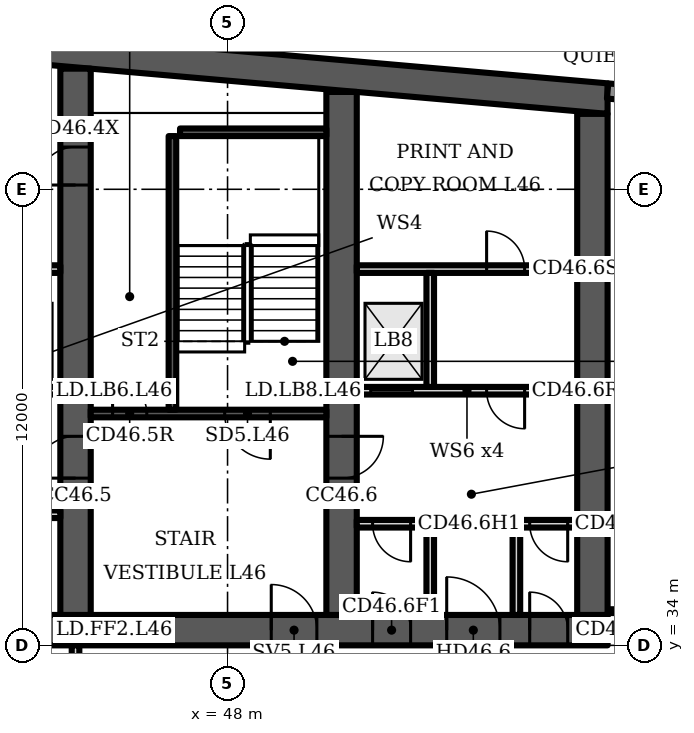
"""IFC4 building model, lengths in metres.
Left out: names, types, materials, properties, quantities, classifications, styles, units other than length and angle.
Written with IfcOpenShell. Run it as: python <this file> out.ifc"""

import sys

from ifc_helpers import new_model, si_unit, direction, frame, frame_2d, origin, place, context, subcontext, project, spatial, polyline, rectangle, outline, extrude, element, fill, save


model = new_model("IFC4")
c1 = context("Model", 3, precision=1e-05, world=origin(), true_north=direction((0.0, 1.0)))
c2 = subcontext(c1, "Body", "Model", "MODEL_VIEW")
j1 = project(units=[si_unit("LENGTHUNIT", "METRE"), si_unit("PLANEANGLEUNIT", "RADIAN")], contexts=[c1])
p1 = place(None, origin())
s1 = spatial("IfcSite", under=j1, at=p1, CompositionType="ELEMENT")
p2 = place(p1, origin())
s2 = spatial("IfcBuilding", under=s1, at=p2, CompositionType="ELEMENT")
p3 = place(p2, frame((0.0, 0.0, 187.9)))
s3 = spatial("IfcBuildingStorey", under=s2, at=p3, CompositionType="ELEMENT", Elevation=187.9)
p4 = place(p3, origin())
e1 = element("IfcWall", 1, at=p4, inside=s3, PredefinedType="SHEAR", context=c2, shape_type="SweptSolid", body=[
    extrude(outline(polyline([(16.0, 47.984), (37.0, 49.822), (58.0, 47.984), (58.0, 48.787), (37.0, 50.625), (16.0, 48.787), (16.0, 47.984)])), origin(), (0.0, 0.0, 1.0), 3.6),
])
p5 = place(p3, frame((16.0, 34.4, 0.0), z_axis=(0.0, 0.0, 1.0), x_axis=(1.0, 0.0, 0.0)))
e2 = element("IfcWall", 2, at=p5, inside=s3, PredefinedType="SHEAR", context=c2, shape_type="SweptSolid", body=[
    extrude(rectangle(XDim=42.0, YDim=0.8, at=frame_2d((21.0, 0.0))), origin(), (0.0, 0.0, 1.0), 3.6),
])
p6 = place(p5, frame((3.2, 0.0, 0.0)))
e3 = element("IfcOpeningElement", 3, at=p6, cuts=e2, PredefinedType="OPENING", context=c2, shape_type="SweptSolid", body=[
    extrude(rectangle(XDim=1.0, YDim=2.1, at=frame_2d((0.5, 1.05))), frame((0.0, 0.41, 0.0), z_axis=(0.0, -1.0, 0.0), x_axis=(1.0, 0.0, 0.0)), (0.0, 0.0, 1.0), 0.82),
])
p7 = place(p5, frame((7.65, 0.0, 0.0)))
e4 = element("IfcOpeningElement", 4, at=p7, cuts=e2, PredefinedType="OPENING", context=c2, shape_type="SweptSolid", body=[
    extrude(rectangle(XDim=1.2, YDim=2.1, at=frame_2d((0.6, 1.05))), frame((0.0, 0.41, 0.0), z_axis=(0.0, -1.0, 0.0), x_axis=(1.0, 0.0, 0.0)), (0.0, 0.0, 1.0), 0.82),
])
p8 = place(p5, frame((14.767, 0.0, 0.0)))
e5 = element("IfcOpeningElement", 5, at=p8, cuts=e2, PredefinedType="OPENING", context=c2, shape_type="SweptSolid", body=[
    extrude(rectangle(XDim=1.1, YDim=2.1, at=frame_2d((0.55, 1.05))), frame((0.0, 0.41, 0.0), z_axis=(0.0, -1.0, 0.0), x_axis=(1.0, 0.0, 0.0)), (0.0, 0.0, 1.0), 0.82),
])
p9 = place(p5, frame((19.133, 0.0, 0.0)))
e6 = element("IfcOpeningElement", 6, at=p9, cuts=e2, PredefinedType="OPENING", context=c2, shape_type="SweptSolid", body=[
    extrude(rectangle(XDim=1.1, YDim=2.1, at=frame_2d((0.55, 1.05))), frame((0.0, 0.41, 0.0), z_axis=(0.0, -1.0, 0.0), x_axis=(1.0, 0.0, 0.0)), (0.0, 0.0, 1.0), 0.82),
])
p10 = place(p5, frame((16.8, 0.0, 0.0)))
e7 = element("IfcOpeningElement", 7, at=p10, cuts=e2, PredefinedType="OPENING", context=c2, shape_type="SweptSolid", body=[
    extrude(rectangle(XDim=1.4, YDim=2.1, at=frame_2d((0.7, 1.05))), frame((0.0, 0.41, 0.0), z_axis=(0.0, -1.0, 0.0), x_axis=(1.0, 0.0, 0.0)), (0.0, 0.0, 1.0), 0.82),
])
p11 = place(p5, frame((21.767, 0.0, 0.0)))
e8 = element("IfcOpeningElement", 8, at=p11, cuts=e2, PredefinedType="OPENING", context=c2, shape_type="SweptSolid", body=[
    extrude(rectangle(XDim=1.1, YDim=2.1, at=frame_2d((0.55, 1.05))), frame((0.0, 0.41, 0.0), z_axis=(0.0, -1.0, 0.0), x_axis=(1.0, 0.0, 0.0)), (0.0, 0.0, 1.0), 0.82),
])
p12 = place(p5, frame((23.95, 0.0, 0.0)))
e9 = element("IfcOpeningElement", 9, at=p12, cuts=e2, PredefinedType="OPENING", context=c2, shape_type="SweptSolid", body=[
    extrude(rectangle(XDim=1.1, YDim=2.1, at=frame_2d((0.55, 1.05))), frame((0.0, 0.41, 0.0), z_axis=(0.0, -1.0, 0.0), x_axis=(1.0, 0.0, 0.0)), (0.0, 0.0, 1.0), 0.82),
])
p13 = place(p5, frame((26.133, 0.0, 0.0)))
e10 = element("IfcOpeningElement", 10, at=p13, cuts=e2, PredefinedType="OPENING", context=c2, shape_type="SweptSolid", body=[
    extrude(rectangle(XDim=1.1, YDim=2.1, at=frame_2d((0.55, 1.05))), frame((0.0, 0.41, 0.0), z_axis=(0.0, -1.0, 0.0), x_axis=(1.0, 0.0, 0.0)), (0.0, 0.0, 1.0), 0.82),
])
p14 = place(p5, frame((33.15, 0.0, 0.0)))
e11 = element("IfcOpeningElement", 11, at=p14, cuts=e2, PredefinedType="OPENING", context=c2, shape_type="SweptSolid", body=[
    extrude(rectangle(XDim=1.2, YDim=2.1, at=frame_2d((0.6, 1.05))), frame((0.0, 0.41, 0.0), z_axis=(0.0, -1.0, 0.0), x_axis=(1.0, 0.0, 0.0)), (0.0, 0.0, 1.0), 0.82),
])
p15 = place(p5, frame((35.817, 0.0, 0.0)))
e12 = element("IfcOpeningElement", 12, at=p15, cuts=e2, PredefinedType="OPENING", context=c2, shape_type="SweptSolid", body=[
    extrude(rectangle(XDim=1.0, YDim=2.1, at=frame_2d((0.5, 1.05))), frame((0.0, 0.41, 0.0), z_axis=(0.0, -1.0, 0.0), x_axis=(1.0, 0.0, 0.0)), (0.0, 0.0, 1.0), 0.82),
])
p16 = place(p5, frame((39.95, 0.0, 0.0)))
e13 = element("IfcOpeningElement", 13, at=p16, cuts=e2, PredefinedType="OPENING", context=c2, shape_type="SweptSolid", body=[
    extrude(rectangle(XDim=1.0, YDim=2.1, at=frame_2d((0.5, 1.05))), frame((0.0, 0.41, 0.0), z_axis=(0.0, -1.0, 0.0), x_axis=(1.0, 0.0, 0.0)), (0.0, 0.0, 1.0), 0.82),
])
p17 = place(p5, frame((37.767, 0.0, 0.0)))
e14 = element("IfcOpeningElement", 14, at=p17, cuts=e2, PredefinedType="OPENING", context=c2, shape_type="SweptSolid", body=[
    extrude(rectangle(XDim=1.4, YDim=2.1, at=frame_2d((0.7, 1.05))), frame((0.0, 0.41, 0.0), z_axis=(0.0, -1.0, 0.0), x_axis=(1.0, 0.0, 0.0)), (0.0, 0.0, 1.0), 0.82),
])
p18 = place(p3, frame((44.0, 34.8, 0.0), z_axis=(0.0, 0.0, 1.0), x_axis=(0.0, 1.0, 0.0)))
e15 = element("IfcWall", 15, at=p18, inside=s3, PredefinedType="SHEAR", context=c2, shape_type="SweptSolid", body=[
    extrude(rectangle(XDim=14.374, YDim=0.8, at=frame_2d((7.187, 0.0))), origin(), (0.0, 0.0, 1.0), 3.6),
])
p19 = place(p18, frame((11.312, 0.0, 0.0)))
e16 = element("IfcOpeningElement", 16, at=p19, cuts=e15, PredefinedType="OPENING", context=c2, shape_type="SweptSolid", body=[
    extrude(rectangle(XDim=1.0, YDim=2.1, at=frame_2d((0.5, 1.05))), frame((0.0, 0.41, 0.0), z_axis=(0.0, -1.0, 0.0), x_axis=(1.0, 0.0, 0.0)), (0.0, 0.0, 1.0), 0.82),
])
p20 = place(p18, frame((3.6, 0.0, 0.0)))
e17 = element("IfcOpeningElement", 17, at=p20, cuts=e15, PredefinedType="OPENING", context=c2, shape_type="SweptSolid", body=[
    extrude(rectangle(XDim=1.1, YDim=2.1, at=frame_2d((0.55, 1.05))), frame((0.0, 0.41, 0.0), z_axis=(0.0, -1.0, 0.0), x_axis=(1.0, 0.0, 0.0)), (0.0, 0.0, 1.0), 0.82),
])
p21 = place(p3, frame((51.0, 34.8, 0.0), z_axis=(0.0, 0.0, 1.0), x_axis=(0.0, 1.0, 0.0)))
e18 = element("IfcWall", 18, at=p21, inside=s3, PredefinedType="SHEAR", context=c2, shape_type="SweptSolid", body=[
    extrude(rectangle(XDim=13.762, YDim=0.8, at=frame_2d((6.881, 0.0))), origin(), (0.0, 0.0, 1.0), 3.6),
])
p22 = place(p21, frame((3.6, 0.0, 0.0)))
e19 = element("IfcOpeningElement", 19, at=p22, cuts=e18, PredefinedType="OPENING", context=c2, shape_type="SweptSolid", body=[
    extrude(rectangle(XDim=1.1, YDim=2.1, at=frame_2d((0.55, 1.05))), frame((0.0, 0.41, 0.0), z_axis=(0.0, -1.0, 0.0), x_axis=(1.0, 0.0, 0.0)), (0.0, 0.0, 1.0), 0.82),
])
p23 = place(p3, frame((57.6, 34.8, 0.0), z_axis=(0.0, 0.0, 1.0), x_axis=(0.0, 1.0, 0.0)))
e20 = element("IfcWall", 20, at=p23, inside=s3, PredefinedType="SHEAR", context=c2, shape_type="SweptSolid", body=[
    extrude(rectangle(XDim=13.184, YDim=0.8, at=frame_2d((6.592, 0.0))), origin(), (0.0, 0.0, 1.0), 3.6),
])
p24 = place(p3, frame((60.983, 48.326, 0.0), z_axis=(0.0, 0.0, 1.0), x_axis=(-0.996194, 0.087168, 0.0)))
e21 = element("IfcWall", 21, at=p24, inside=s3, PredefinedType="SOLIDWALL", context=c2, shape_type="SweptSolid", body=[
    extrude(rectangle(XDim=2.994, YDim=0.4, at=frame_2d((1.497, 0.0))), origin(), (0.0, 0.0, 1.0), 3.2),
])
p25 = place(p3, frame((37.4, 40.7, 0.0), z_axis=(0.0, 0.0, 1.0), x_axis=(1.0, 0.0, 0.0)))
e22 = element("IfcWall", 22, at=p25, inside=s3, PredefinedType="PARTITIONING", context=c2, shape_type="SweptSolid", body=[
    extrude(rectangle(XDim=6.2, YDim=0.2, at=frame_2d((3.1, 0.0))), origin(), (0.0, 0.0, 1.0), 3.2),
])
p26 = place(p25, frame((0.367, 0.0, 0.0)))
e23 = element("IfcOpeningElement", 23, at=p26, cuts=e22, PredefinedType="OPENING", context=c2, shape_type="SweptSolid", body=[
    extrude(rectangle(XDim=1.1, YDim=2.1, at=frame_2d((0.55, 1.05))), frame((0.0, 0.11, 0.0), z_axis=(0.0, -1.0, 0.0), x_axis=(1.0, 0.0, 0.0)), (0.0, 0.0, 1.0), 0.22),
])
p27 = place(p25, frame((2.55, 0.0, 0.0)))
e24 = element("IfcOpeningElement", 24, at=p27, cuts=e22, PredefinedType="OPENING", context=c2, shape_type="SweptSolid", body=[
    extrude(rectangle(XDim=1.1, YDim=2.1, at=frame_2d((0.55, 1.05))), frame((0.0, 0.11, 0.0), z_axis=(0.0, -1.0, 0.0), x_axis=(1.0, 0.0, 0.0)), (0.0, 0.0, 1.0), 0.22),
])
p28 = place(p25, frame((4.733, 0.0, 0.0)))
e25 = element("IfcOpeningElement", 25, at=p28, cuts=e22, PredefinedType="OPENING", context=c2, shape_type="SweptSolid", body=[
    extrude(rectangle(XDim=1.1, YDim=2.1, at=frame_2d((0.55, 1.05))), frame((0.0, 0.11, 0.0), z_axis=(0.0, -1.0, 0.0), x_axis=(1.0, 0.0, 0.0)), (0.0, 0.0, 1.0), 0.22),
])
p29 = place(p3, origin())
e26 = element("IfcWall", 26, at=p29, inside=s3, PredefinedType="PARTITIONING", context=c2, shape_type="SweptSolid", body=[
    extrude(outline(polyline([(41.567, 37.1), (39.433, 37.1), (39.433, 34.8), (39.233, 34.8), (39.233, 37.65), (37.4, 37.65), (37.4, 37.85), (39.233, 37.85), (39.433, 37.85), (39.433, 37.3), (41.567, 37.3), (41.567, 37.55), (41.767, 37.55), (43.6, 37.55), (43.6, 37.35), (41.767, 37.35), (41.767, 34.8), (41.567, 34.8), (41.567, 37.1)])), origin(), (0.0, 0.0, 1.0), 3.2),
])
p30 = place(p3, origin())
e27 = element("IfcWall", 27, at=p30, inside=s3, PredefinedType="PARTITIONING", context=c2, shape_type="SweptSolid", body=[
    extrude(outline(polyline([(39.433, 40.8), (39.233, 40.8), (39.233, 43.8), (37.4, 43.8), (37.4, 44.0), (43.6, 44.0), (43.6, 43.8), (41.767, 43.8), (41.767, 40.8), (41.567, 40.8), (41.567, 43.8), (39.433, 43.8), (39.433, 40.8)])), origin(), (0.0, 0.0, 1.0), 3.2),
])
p31 = place(p3, frame((44.4, 40.1, 0.0), z_axis=(0.0, 0.0, 1.0), x_axis=(1.0, 0.0, 0.0)))
e28 = element("IfcWall", 28, at=p31, inside=s3, PredefinedType="SHEAR", context=c2, shape_type="SweptSolid", body=[
    extrude(rectangle(XDim=6.2, YDim=0.2, at=frame_2d((3.1, 0.0))), origin(), (0.0, 0.0, 1.0), 3.2),
])
p32 = place(p31, frame((3.525, 0.0, 0.0)))
e29 = element("IfcOpeningElement", 29, at=p32, cuts=e28, PredefinedType="OPENING", context=c2, shape_type="SweptSolid", body=[
    extrude(rectangle(XDim=1.2, YDim=2.1, at=frame_2d((0.6, 1.05))), frame((0.0, 0.11, 0.0), z_axis=(0.0, -1.0, 0.0), x_axis=(1.0, 0.0, 0.0)), (0.0, 0.0, 1.0), 0.22),
])
p33 = place(p31, frame((0.575, 0.0, 0.0)))
e30 = element("IfcOpeningElement", 30, at=p33, cuts=e28, PredefinedType="OPENING", context=c2, shape_type="SweptSolid", body=[
    extrude(rectangle(XDim=0.9, YDim=2.1, at=frame_2d((0.45, 1.05))), frame((0.0, 0.11, 0.0), z_axis=(0.0, -1.0, 0.0), x_axis=(1.0, 0.0, 0.0)), (0.0, 0.0, 1.0), 0.22),
])
p34 = place(p3, frame((46.55, 40.2, 0.0), z_axis=(0.0, 0.0, 1.0), x_axis=(0.0, 1.0, 0.0)))
e31 = element("IfcWall", 31, at=p34, inside=s3, PredefinedType="SHEAR", context=c2, shape_type="SweptSolid", body=[
    extrude(rectangle(XDim=7.2, YDim=0.2, at=frame_2d((3.6, 0.0))), origin(), (0.0, 0.0, 1.0), 3.2),
])
p35 = place(p3, frame((46.75, 47.5, 0.0), z_axis=(0.0, 0.0, 1.0), x_axis=(1.0, 0.0, 0.0)))
e32 = element("IfcWall", 32, at=p35, inside=s3, PredefinedType="SHEAR", context=c2, shape_type="SweptSolid", body=[
    extrude(rectangle(XDim=3.85, YDim=0.2, at=frame_2d((1.925, 0.0))), origin(), (0.0, 0.0, 1.0), 3.2),
])
p36 = place(p3, frame((51.4, 37.2, 0.0), z_axis=(0.0, 0.0, 1.0), x_axis=(1.0, 0.0, 0.0)))
e33 = element("IfcWall", 33, at=p36, inside=s3, PredefinedType="PARTITIONING", context=c2, shape_type="SweptSolid", body=[
    extrude(rectangle(XDim=1.833, YDim=0.2, at=frame_2d((0.917, 0.0))), origin(), (0.0, 0.0, 1.0), 3.2),
])
p37 = place(p36, frame((0.417, 0.0, 0.0)))
e34 = element("IfcOpeningElement", 34, at=p37, cuts=e33, PredefinedType="OPENING", context=c2, shape_type="SweptSolid", body=[
    extrude(rectangle(XDim=1.0, YDim=2.1, at=frame_2d((0.5, 1.05))), frame((0.0, 0.11, 0.0), z_axis=(0.0, -1.0, 0.0), x_axis=(1.0, 0.0, 0.0)), (0.0, 0.0, 1.0), 0.22),
])
p38 = place(p3, frame((55.7, 37.2, 0.0), z_axis=(0.0, 0.0, 1.0), x_axis=(1.0, 0.0, 0.0)))
e35 = element("IfcWall", 35, at=p38, inside=s3, PredefinedType="PARTITIONING", context=c2, shape_type="SweptSolid", body=[
    extrude(rectangle(XDim=1.5, YDim=0.2, at=frame_2d((0.75, 0.0))), origin(), (0.0, 0.0, 1.0), 3.2),
])
p39 = place(p38, frame((0.25, 0.0, 0.0)))
e36 = element("IfcOpeningElement", 36, at=p39, cuts=e35, PredefinedType="OPENING", context=c2, shape_type="SweptSolid", body=[
    extrude(rectangle(XDim=1.0, YDim=2.1, at=frame_2d((0.5, 1.05))), frame((0.0, 0.11, 0.0), z_axis=(0.0, -1.0, 0.0), x_axis=(1.0, 0.0, 0.0)), (0.0, 0.0, 1.0), 0.22),
])
p40 = place(p3, frame((51.4, 40.7, 0.0), z_axis=(0.0, 0.0, 1.0), x_axis=(1.0, 0.0, 0.0)))
e37 = element("IfcWall", 37, at=p40, inside=s3, PredefinedType="PARTITIONING", context=c2, shape_type="SweptSolid", body=[
    extrude(rectangle(XDim=5.8, YDim=0.2, at=frame_2d((2.9, 0.0))), origin(), (0.0, 0.0, 1.0), 3.2),
])
p41 = place(p40, frame((0.367, 0.0, 0.0)))
e38 = element("IfcOpeningElement", 38, at=p41, cuts=e37, PredefinedType="OPENING", context=c2, shape_type="SweptSolid", body=[
    extrude(rectangle(XDim=1.1, YDim=2.1, at=frame_2d((0.55, 1.05))), frame((0.0, 0.11, 0.0), z_axis=(0.0, -1.0, 0.0), x_axis=(1.0, 0.0, 0.0)), (0.0, 0.0, 1.0), 0.22),
])
p42 = place(p40, frame((3.417, 0.0, 0.0)))
e39 = element("IfcOpeningElement", 39, at=p42, cuts=e37, PredefinedType="OPENING", context=c2, shape_type="SweptSolid", body=[
    extrude(rectangle(XDim=1.0, YDim=2.1, at=frame_2d((0.5, 1.05))), frame((0.0, 0.11, 0.0), z_axis=(0.0, -1.0, 0.0), x_axis=(1.0, 0.0, 0.0)), (0.0, 0.0, 1.0), 0.22),
])
p43 = place(p3, frame((51.4, 43.9, 0.0), z_axis=(0.0, 0.0, 1.0), x_axis=(1.0, 0.0, 0.0)))
e40 = element("IfcWall", 40, at=p43, inside=s3, PredefinedType="PARTITIONING", context=c2, shape_type="SweptSolid", body=[
    extrude(rectangle(XDim=5.8, YDim=0.2, at=frame_2d((2.9, 0.0))), origin(), (0.0, 0.0, 1.0), 3.2),
])
p44 = place(p43, frame((3.417, 0.0, 0.0)))
e41 = element("IfcOpeningElement", 41, at=p44, cuts=e40, PredefinedType="OPENING", context=c2, shape_type="SweptSolid", body=[
    extrude(rectangle(XDim=1.0, YDim=2.1, at=frame_2d((0.5, 1.05))), frame((0.0, 0.11, 0.0), z_axis=(0.0, -1.0, 0.0), x_axis=(1.0, 0.0, 0.0)), (0.0, 0.0, 1.0), 0.22),
])
p45 = place(p3, origin())
e42 = element("IfcWall", 42, at=p45, inside=s3, PredefinedType="PARTITIONING", context=c2, shape_type="SweptSolid", body=[
    extrude(outline(polyline([(53.233, 34.8), (53.233, 37.3), (53.433, 37.3), (53.433, 34.8), (53.233, 34.8)])), origin(), (0.0, 0.0, 1.0), 3.2),
])
p46 = place(p3, origin())
e43 = element("IfcWall", 43, at=p46, inside=s3, PredefinedType="PARTITIONING", context=c2, shape_type="SweptSolid", body=[
    extrude(outline(polyline([(55.5, 34.8), (55.5, 37.3), (55.7, 37.3), (55.7, 34.8), (55.5, 34.8)])), origin(), (0.0, 0.0, 1.0), 3.2),
])
p47 = place(p3, origin())
e44 = element("IfcWall", 44, at=p47, inside=s3, PredefinedType="PARTITIONING", context=c2, shape_type="SweptSolid", body=[
    extrude(outline(polyline([(53.433, 40.8), (53.433, 43.8), (53.233, 43.8), (53.233, 40.8), (53.433, 40.8)])), origin(), (0.0, 0.0, 1.0), 3.2),
])
p48 = place(p3, frame((44.0, 30.5, 0.0), z_axis=(0.0, 0.0, 1.0), x_axis=(0.0, 1.0, 0.0)))
e45 = element("IfcWall", 45, at=p48, inside=s3, PredefinedType="PARTITIONING", context=c2, shape_type="SweptSolid", body=[
    extrude(rectangle(XDim=3.5, YDim=0.2, at=frame_2d((1.75, 0.0))), origin(), (0.0, 0.0, 1.0), 3.2),
])
p49 = place(p48, frame((1.2, 0.0, 0.0)))
e46 = element("IfcOpeningElement", 46, at=p49, cuts=e45, PredefinedType="OPENING", context=c2, shape_type="SweptSolid", body=[
    extrude(rectangle(XDim=1.1, YDim=2.1, at=frame_2d((0.55, 1.05))), frame((0.0, 0.11, 0.0), z_axis=(0.0, -1.0, 0.0), x_axis=(1.0, 0.0, 0.0)), (0.0, 0.0, 1.0), 0.22),
])
p50 = place(p3, frame((58.02, 34.9, 0.0), z_axis=(0.0, 0.0, 1.0), x_axis=(1.0, 0.0, 0.0)))
e47 = element("IfcWall", 47, at=p50, inside=s3, PredefinedType="PARTITIONING", context=c2, shape_type="SweptSolid", body=[
    extrude(rectangle(XDim=1.48, YDim=0.1, at=frame_2d((0.74, 0.0))), origin(), (0.0, 0.0, 1.0), 3.2),
])
p51 = place(p19, origin())
e48 = element("IfcDoor", 48, at=p51, inside=s3, OperationType="SINGLE_SWING_LEFT", PredefinedType="DOOR", context=c2, shape_type="SweptSolid", body=[
    extrude(rectangle(XDim=1.0, YDim=2.1, at=frame_2d((0.5, 1.05))), frame((0.0, 0.4, 0.0), z_axis=(0.0, -1.0, 0.0), x_axis=(1.0, 0.0, 0.0)), (0.0, 0.0, 1.0), 0.8),
])
fill(e16, e48)
p52 = place(p32, origin())
e49 = element("IfcDoor", 49, at=p52, inside=s3, OperationType="SINGLE_SWING_RIGHT", PredefinedType="DOOR", context=c2, shape_type="SweptSolid", body=[
    extrude(rectangle(XDim=1.2, YDim=2.1, at=frame_2d((0.6, 1.05))), frame((0.0, 0.025, 0.0), z_axis=(0.0, -1.0, 0.0), x_axis=(1.0, 0.0, 0.0)), (0.0, 0.0, 1.0), 0.05),
])
fill(e29, e49)
p53 = place(p33, origin())
e50 = element("IfcDoor", 50, at=p53, inside=s3, OperationType="SINGLE_SWING_LEFT", PredefinedType="DOOR", context=c2, shape_type="SweptSolid", body=[
    extrude(rectangle(XDim=0.9, YDim=2.1, at=frame_2d((0.45, 1.05))), frame((0.0, 0.025, 0.0), z_axis=(0.0, -1.0, 0.0), x_axis=(1.0, 0.0, 0.0)), (0.0, 0.0, 1.0), 0.05),
])
fill(e30, e50)
p54 = place(p14, origin())
e51 = element("IfcDoor", 51, at=p54, inside=s3, OperationType="SINGLE_SWING_LEFT", PredefinedType="DOOR", context=c2, shape_type="SweptSolid", body=[
    extrude(rectangle(XDim=1.2, YDim=2.1, at=frame_2d((0.6, 1.05))), frame((0.0, 0.025, 0.0), z_axis=(0.0, -1.0, 0.0), x_axis=(1.0, 0.0, 0.0)), (0.0, 0.0, 1.0), 0.05),
])
fill(e11, e51)
p55 = place(p15, origin())
e52 = element("IfcDoor", 52, at=p55, inside=s3, OperationType="SINGLE_SWING_LEFT", PredefinedType="DOOR", context=c2, shape_type="SweptSolid", body=[
    extrude(rectangle(XDim=1.0, YDim=2.1, at=frame_2d((0.5, 1.05))), frame((0.0, 0.4, 0.0), z_axis=(0.0, -1.0, 0.0), x_axis=(1.0, 0.0, 0.0)), (0.0, 0.0, 1.0), 0.8),
])
fill(e12, e52)
p56 = place(p37, origin())
e53 = element("IfcDoor", 53, at=p56, inside=s3, OperationType="SINGLE_SWING_RIGHT", PredefinedType="DOOR", context=c2, shape_type="SweptSolid", body=[
    extrude(rectangle(XDim=1.0, YDim=2.1, at=frame_2d((0.5, 1.05))), frame((0.0, 0.025, 0.0), z_axis=(0.0, -1.0, 0.0), x_axis=(1.0, 0.0, 0.0)), (0.0, 0.0, 1.0), 0.05),
])
fill(e34, e53)
p57 = place(p16, origin())
e54 = element("IfcDoor", 54, at=p57, inside=s3, OperationType="SINGLE_SWING_LEFT", PredefinedType="DOOR", context=c2, shape_type="SweptSolid", body=[
    extrude(rectangle(XDim=1.0, YDim=2.1, at=frame_2d((0.5, 1.05))), frame((0.0, 0.4, 0.0), z_axis=(0.0, -1.0, 0.0), x_axis=(1.0, 0.0, 0.0)), (0.0, 0.0, 1.0), 0.8),
])
fill(e13, e54)
p58 = place(p39, origin())
e55 = element("IfcDoor", 55, at=p58, inside=s3, OperationType="SINGLE_SWING_RIGHT", PredefinedType="DOOR", context=c2, shape_type="SweptSolid", body=[
    extrude(rectangle(XDim=1.0, YDim=2.1, at=frame_2d((0.5, 1.05))), frame((0.0, 0.025, 0.0), z_axis=(0.0, -1.0, 0.0), x_axis=(1.0, 0.0, 0.0)), (0.0, 0.0, 1.0), 0.05),
])
fill(e36, e55)
p59 = place(p17, origin())
e56 = element("IfcDoor", 56, at=p59, inside=s3, OperationType="DOUBLE_DOOR_SINGLE_SWING", PredefinedType="DOOR", context=c2, shape_type="SweptSolid", body=[
    extrude(rectangle(XDim=1.4, YDim=2.1, at=frame_2d((0.7, 1.05))), frame((0.0, 0.025, 0.0), z_axis=(0.0, -1.0, 0.0), x_axis=(1.0, 0.0, 0.0)), (0.0, 0.0, 1.0), 0.05),
])
fill(e14, e56)
p60 = place(p41, origin())
e57 = element("IfcDoor", 57, at=p60, inside=s3, OperationType="DOUBLE_DOOR_SLIDING", PredefinedType="DOOR", context=c2, shape_type="SweptSolid", body=[
    extrude(rectangle(XDim=1.1, YDim=2.1, at=frame_2d((0.55, 1.05))), frame((0.0, 0.025, 0.0), z_axis=(0.0, -1.0, 0.0), x_axis=(1.0, 0.0, 0.0)), (0.0, 0.0, 1.0), 0.05),
])
fill(e38, e57)
p61 = place(p42, origin())
e58 = element("IfcDoor", 58, at=p61, inside=s3, OperationType="SINGLE_SWING_RIGHT", PredefinedType="DOOR", context=c2, shape_type="SweptSolid", body=[
    extrude(rectangle(XDim=1.0, YDim=2.1, at=frame_2d((0.5, 1.05))), frame((0.0, 0.025, 0.0), z_axis=(0.0, -1.0, 0.0), x_axis=(1.0, 0.0, 0.0)), (0.0, 0.0, 1.0), 0.05),
])
fill(e39, e58)
p62 = place(p44, origin())
e59 = element("IfcDoor", 59, at=p62, inside=s3, OperationType="SINGLE_SWING_LEFT", PredefinedType="DOOR", context=c2, shape_type="SweptSolid", body=[
    extrude(rectangle(XDim=1.0, YDim=2.1, at=frame_2d((0.5, 1.05))), frame((0.0, 0.025, 0.0), z_axis=(0.0, -1.0, 0.0), x_axis=(1.0, 0.0, 0.0)), (0.0, 0.0, 1.0), 0.05),
])
fill(e41, e59)
p63 = place(p20, origin())
e60 = element("IfcDoor", 60, at=p63, inside=s3, OperationType="SINGLE_SWING_LEFT", PredefinedType="DOOR", context=c2, shape_type="SweptSolid", body=[
    extrude(rectangle(XDim=1.1, YDim=2.1, at=frame_2d((0.55, 1.05))), frame((0.0, 0.025, 0.0), z_axis=(0.0, -1.0, 0.0), x_axis=(1.0, 0.0, 0.0)), (0.0, 0.0, 1.0), 0.05),
])
fill(e17, e60)
p64 = place(p22, origin())
e61 = element("IfcDoor", 61, at=p64, inside=s3, OperationType="SINGLE_SWING_RIGHT", PredefinedType="DOOR", context=c2, shape_type="SweptSolid", body=[
    extrude(rectangle(XDim=1.1, YDim=2.1, at=frame_2d((0.55, 1.05))), frame((0.0, 0.025, 0.0), z_axis=(0.0, -1.0, 0.0), x_axis=(1.0, 0.0, 0.0)), (0.0, 0.0, 1.0), 0.05),
])
fill(e19, e61)
save(model, sys.argv[1])
